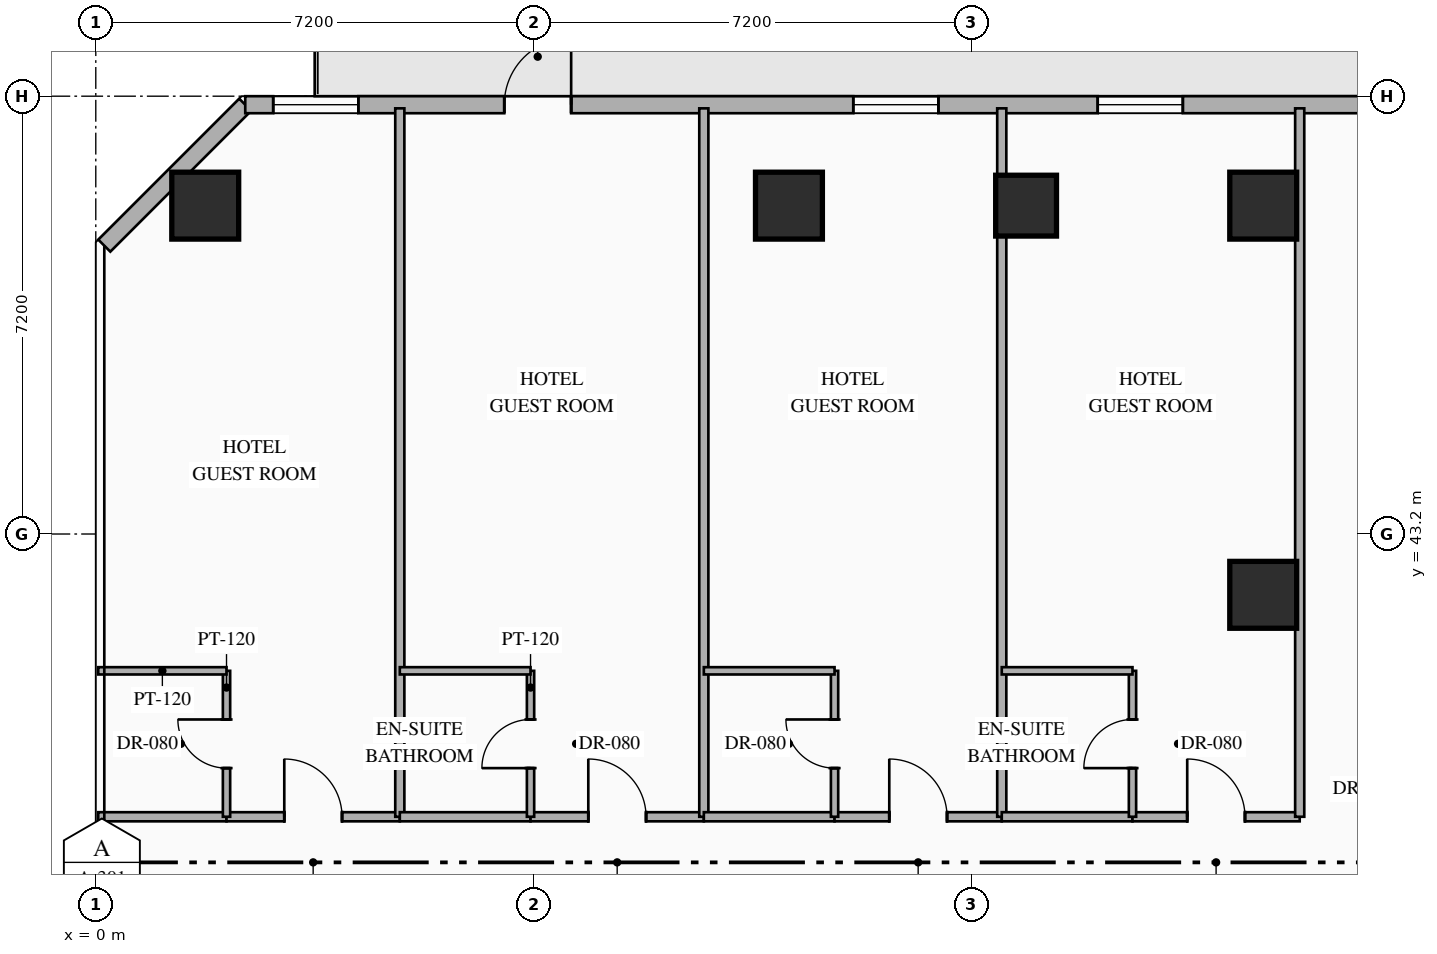
"""IFC4 building model, lengths in metres.
Left out: names, types, materials, properties, quantities, classifications, styles, units other than length and angle.
Written with IfcOpenShell. Run it as: python <this file> out.ifc"""

import sys

from ifc_helpers import new_model, si_unit, direction, frame, frame_2d, origin, origin_2d, place, context, subcontext, project, spatial, rectangle, hollow_rectangle, extrude, element, fill, save


model = new_model("IFC4")
c1 = context("Model", 3, precision=1e-05, world=origin(), true_north=direction((0.0, 1.0)))
c2 = subcontext(c1, "Body", "Model", "MODEL_VIEW")
j1 = project(units=[si_unit("LENGTHUNIT", "METRE"), si_unit("PLANEANGLEUNIT", "RADIAN")], contexts=[c1])
p1 = place(None, origin())
s1 = spatial("IfcSite", under=j1, at=p1, CompositionType="ELEMENT")
p2 = place(p1, origin())
s2 = spatial("IfcBuilding", under=s1, at=p2, CompositionType="ELEMENT")
p3 = place(p2, frame((0.0, 0.0, 56.7)))
s3 = spatial("IfcBuildingStorey", under=s2, at=p3, CompositionType="ELEMENT", Elevation=56.7)
for number, where, z_axis, x_axis in (
    (1, (1.8, 48.6, 0.0), (0.0, 0.0, 1.0), (1.0, 0.0, 0.0)),
    (2, (11.4, 48.6, 0.0), (0.0, 0.0, 1.0), (1.0, 0.0, 0.0)),
    (3, (19.2, 48.6, 0.0), (0.0, 0.0, 1.0), (1.0, 0.0, 0.0)),
    (4, (19.2, 42.2, 0.0), (0.0, 0.0, 1.0), (1.0, 0.0, 0.0)),
):
    element("IfcColumn", number, at=place(p3, frame(where, z_axis=z_axis, x_axis=x_axis)), inside=s3, PredefinedType="COLUMN", context=c2, shape_type="SweptSolid", body=[
        extrude(hollow_rectangle(XDim=1.1, YDim=1.1, WallThickness=0.04, at=origin_2d()), origin(), (0.0, 0.0, 1.0), 3.35),
    ])
p4 = place(p3, frame((15.3, 48.6, 0.0), z_axis=(0.0, 0.0, 1.0), x_axis=(1.0, 0.0, 0.0)))
e5 = element("IfcColumn", 5, at=p4, inside=s3, PredefinedType="COLUMN", context=c2, shape_type="SweptSolid", body=[
    extrude(hollow_rectangle(XDim=1.0, YDim=1.0, WallThickness=0.038, at=origin_2d()), origin(), (0.0, 0.0, 1.0), 3.35),
])
p5 = place(p3, frame((0.14, 47.942, 0.0), z_axis=(0.0, 0.0, 1.0), x_axis=(0.707106781187, 0.707106781187, 0.0)))
e6 = element("IfcWall", 6, at=p5, inside=s3, PredefinedType="STANDARD", context=c2, shape_type="SweptSolid", body=[
    extrude(rectangle(XDim=3.278, YDim=0.28, at=frame_2d((1.639, 0.0))), origin(), (0.0, 0.0, 1.0), 3.13),
])
p6 = place(p3, frame((2.458, 50.26, 0.0), z_axis=(0.0, 0.0, 1.0), x_axis=(1.0, 0.0, 0.0)))
e7 = element("IfcWall", 7, at=p6, inside=s3, PredefinedType="STANDARD", context=c2, shape_type="SweptSolid", body=[
    extrude(rectangle(XDim=40.084, YDim=0.28, at=frame_2d((20.042, 0.0))), origin(), (0.0, 0.0, 1.0), 3.13),
])
p7 = place(p6, frame((4.26, 0.0, 0.0)))
e8 = element("IfcOpeningElement", 8, at=p7, cuts=e7, PredefinedType="OPENING", context=c2, shape_type="SweptSolid", body=[
    extrude(rectangle(XDim=1.1, YDim=2.2, at=frame_2d((0.55, 1.1))), frame((0.0, 0.15, 0.0), z_axis=(0.0, -1.0, 0.0), x_axis=(1.0, 0.0, 0.0)), (0.0, 0.0, 1.0), 0.3),
])
p8 = place(p6, frame((0.46, 0.0, 0.85)))
e9 = element("IfcOpeningElement", 9, at=p8, cuts=e7, PredefinedType="OPENING", context=c2, shape_type="SweptSolid", body=[
    extrude(rectangle(XDim=1.4, YDim=1.8, at=frame_2d((0.7, 0.9))), frame((0.0, 0.15, 0.0), z_axis=(0.0, -1.0, 0.0), x_axis=(1.0, 0.0, 0.0)), (0.0, 0.0, 1.0), 0.3),
])
p9 = place(p6, frame((10.0, 0.0, 0.85)))
e10 = element("IfcOpeningElement", 10, at=p9, cuts=e7, PredefinedType="OPENING", context=c2, shape_type="SweptSolid", body=[
    extrude(rectangle(XDim=1.4, YDim=1.8, at=frame_2d((0.7, 0.9))), frame((0.0, 0.15, 0.0), z_axis=(0.0, -1.0, 0.0), x_axis=(1.0, 0.0, 0.0)), (0.0, 0.0, 1.0), 0.3),
])
p10 = place(p6, frame((14.02, 0.0, 0.85)))
e11 = element("IfcOpeningElement", 11, at=p10, cuts=e7, PredefinedType="OPENING", context=c2, shape_type="SweptSolid", body=[
    extrude(rectangle(XDim=1.4, YDim=1.8, at=frame_2d((0.7, 0.9))), frame((0.0, 0.15, 0.0), z_axis=(0.0, -1.0, 0.0), x_axis=(1.0, 0.0, 0.0)), (0.0, 0.0, 1.0), 0.3),
])
p11 = place(p6, frame((20.789, 0.0, 0.85)))
e12 = element("IfcOpeningElement", 12, at=p11, cuts=e7, PredefinedType="OPENING", context=c2, shape_type="SweptSolid", body=[
    extrude(rectangle(XDim=1.4, YDim=1.8, at=frame_2d((0.7, 0.9))), frame((0.0, 0.15, 0.0), z_axis=(0.0, -1.0, 0.0), x_axis=(1.0, 0.0, 0.0)), (0.0, 0.0, 1.0), 0.3),
])
p12 = place(p6, frame((24.664, 0.0, 0.85)))
e13 = element("IfcOpeningElement", 13, at=p12, cuts=e7, PredefinedType="OPENING", context=c2, shape_type="SweptSolid", body=[
    extrude(rectangle(XDim=1.4, YDim=1.8, at=frame_2d((0.7, 0.9))), frame((0.0, 0.15, 0.0), z_axis=(0.0, -1.0, 0.0), x_axis=(1.0, 0.0, 0.0)), (0.0, 0.0, 1.0), 0.3),
])
p13 = place(p6, frame((26.803, 0.0, 0.85)))
e14 = element("IfcOpeningElement", 14, at=p13, cuts=e7, PredefinedType="OPENING", context=c2, shape_type="SweptSolid", body=[
    extrude(rectangle(XDim=1.4, YDim=1.8, at=frame_2d((0.7, 0.9))), frame((0.0, 0.15, 0.0), z_axis=(0.0, -1.0, 0.0), x_axis=(1.0, 0.0, 0.0)), (0.0, 0.0, 1.0), 0.3),
])
p14 = place(p6, frame((32.703, 0.0, 0.85)))
e15 = element("IfcOpeningElement", 15, at=p14, cuts=e7, PredefinedType="OPENING", context=c2, shape_type="SweptSolid", body=[
    extrude(rectangle(XDim=1.4, YDim=1.8, at=frame_2d((0.7, 0.9))), frame((0.0, 0.15, 0.0), z_axis=(0.0, -1.0, 0.0), x_axis=(1.0, 0.0, 0.0)), (0.0, 0.0, 1.0), 0.3),
])
p15 = place(p6, frame((36.967, 0.0, 0.85)))
e16 = element("IfcOpeningElement", 16, at=p15, cuts=e7, PredefinedType="OPENING", context=c2, shape_type="SweptSolid", body=[
    extrude(rectangle(XDim=1.4, YDim=1.8, at=frame_2d((0.7, 0.9))), frame((0.0, 0.15, 0.0), z_axis=(0.0, -1.0, 0.0), x_axis=(1.0, 0.0, 0.0)), (0.0, 0.0, 1.0), 0.3),
])
p16 = place(p3, frame((0.04, 38.55, 0.0), z_axis=(0.0, 0.0, 1.0), x_axis=(1.0, 0.0, 0.0)))
e17 = element("IfcWall", 17, at=p16, inside=s3, PredefinedType="PARTITIONING", context=c2, shape_type="SweptSolid", body=[
    extrude(rectangle(XDim=2.11, YDim=0.15, at=frame_2d((1.055, 0.0))), origin(), (0.0, 0.0, 1.0), 2.775),
])
p17 = place(p3, frame((2.15, 38.55, 0.0), z_axis=(0.0, 0.0, 1.0), x_axis=(1.0, 0.0, 0.0)))
e18 = element("IfcWall", 18, at=p17, inside=s3, PredefinedType="PARTITIONING", context=c2, shape_type="SweptSolid", body=[
    extrude(rectangle(XDim=2.85, YDim=0.15, at=frame_2d((1.425, 0.0))), origin(), (0.0, 0.0, 1.0), 2.775),
])
p18 = place(p17, frame((0.95, 0.0, 0.0)))
e19 = element("IfcOpeningElement", 19, at=p18, cuts=e18, PredefinedType="OPENING", context=c2, shape_type="SweptSolid", body=[
    extrude(rectangle(XDim=0.95, YDim=2.15, at=frame_2d((0.475, 1.075))), frame((0.0, 0.085, 0.0), z_axis=(0.0, -1.0, 0.0), x_axis=(1.0, 0.0, 0.0)), (0.0, 0.0, 1.0), 0.17),
])
p19 = place(p3, frame((2.15, 38.55, 0.0), z_axis=(0.0, 0.0, 1.0), x_axis=(0.0, 1.0, 0.0)))
e20 = element("IfcWall", 20, at=p19, inside=s3, PredefinedType="PARTITIONING", context=c2, shape_type="SweptSolid", body=[
    extrude(rectangle(XDim=2.4, YDim=0.12, at=frame_2d((1.2, 0.0))), origin(), (0.0, 0.0, 1.0), 3.13),
])
p20 = place(p19, frame((0.8, 0.0, 0.0)))
e21 = element("IfcOpeningElement", 21, at=p20, cuts=e20, PredefinedType="OPENING", context=c2, shape_type="SweptSolid", body=[
    extrude(rectangle(XDim=0.8, YDim=2.06, at=frame_2d((0.4, 1.03))), frame((0.0, 0.07, 0.0), z_axis=(0.0, -1.0, 0.0), x_axis=(1.0, 0.0, 0.0)), (0.0, 0.0, 1.0), 0.14),
])
p21 = place(p3, frame((0.04, 40.95, 0.0), z_axis=(0.0, 0.0, 1.0), x_axis=(1.0, 0.0, 0.0)))
e22 = element("IfcWall", 22, at=p21, inside=s3, PredefinedType="PARTITIONING", context=c2, shape_type="SweptSolid", body=[
    extrude(rectangle(XDim=2.11, YDim=0.12, at=frame_2d((1.055, 0.0))), origin(), (0.0, 0.0, 1.0), 2.775),
])
p22 = place(p3, frame((5.0, 38.55, 0.0), z_axis=(0.0, 0.0, 1.0), x_axis=(0.0, 1.0, 0.0)))
e23 = element("IfcWall", 23, at=p22, inside=s3, PredefinedType="PARTITIONING", context=c2, shape_type="SweptSolid", body=[
    extrude(rectangle(XDim=11.65, YDim=0.15, at=frame_2d((5.825, 0.0))), origin(), (0.0, 0.0, 1.0), 3.13),
])
p23 = place(p3, frame((5.0, 38.55, 0.0), z_axis=(0.0, 0.0, 1.0), x_axis=(1.0, 0.0, 0.0)))
e24 = element("IfcWall", 24, at=p23, inside=s3, PredefinedType="PARTITIONING", context=c2, shape_type="SweptSolid", body=[
    extrude(rectangle(XDim=2.15, YDim=0.15, at=frame_2d((1.075, 0.0))), origin(), (0.0, 0.0, 1.0), 2.775),
])
p24 = place(p3, frame((7.15, 38.55, 0.0), z_axis=(0.0, 0.0, 1.0), x_axis=(1.0, 0.0, 0.0)))
e25 = element("IfcWall", 25, at=p24, inside=s3, PredefinedType="PARTITIONING", context=c2, shape_type="SweptSolid", body=[
    extrude(rectangle(XDim=2.85, YDim=0.15, at=frame_2d((1.425, 0.0))), origin(), (0.0, 0.0, 1.0), 2.775),
])
p25 = place(p24, frame((0.95, 0.0, 0.0)))
e26 = element("IfcOpeningElement", 26, at=p25, cuts=e25, PredefinedType="OPENING", context=c2, shape_type="SweptSolid", body=[
    extrude(rectangle(XDim=0.95, YDim=2.15, at=frame_2d((0.475, 1.075))), frame((0.0, 0.085, 0.0), z_axis=(0.0, -1.0, 0.0), x_axis=(1.0, 0.0, 0.0)), (0.0, 0.0, 1.0), 0.17),
])
p26 = place(p3, frame((7.15, 38.55, 0.0), z_axis=(0.0, 0.0, 1.0), x_axis=(0.0, 1.0, 0.0)))
e27 = element("IfcWall", 27, at=p26, inside=s3, PredefinedType="PARTITIONING", context=c2, shape_type="SweptSolid", body=[
    extrude(rectangle(XDim=2.4, YDim=0.12, at=frame_2d((1.2, 0.0))), origin(), (0.0, 0.0, 1.0), 3.13),
])
p27 = place(p26, frame((0.8, 0.0, 0.0)))
e28 = element("IfcOpeningElement", 28, at=p27, cuts=e27, PredefinedType="OPENING", context=c2, shape_type="SweptSolid", body=[
    extrude(rectangle(XDim=0.8, YDim=2.06, at=frame_2d((0.4, 1.03))), frame((0.0, 0.07, 0.0), z_axis=(0.0, -1.0, 0.0), x_axis=(1.0, 0.0, 0.0)), (0.0, 0.0, 1.0), 0.14),
])
p28 = place(p3, frame((5.0, 40.95, 0.0), z_axis=(0.0, 0.0, 1.0), x_axis=(1.0, 0.0, 0.0)))
e29 = element("IfcWall", 29, at=p28, inside=s3, PredefinedType="PARTITIONING", context=c2, shape_type="SweptSolid", body=[
    extrude(rectangle(XDim=2.15, YDim=0.12, at=frame_2d((1.075, 0.0))), origin(), (0.0, 0.0, 1.0), 2.775),
])
p29 = place(p3, frame((10.0, 38.55, 0.0), z_axis=(0.0, 0.0, 1.0), x_axis=(0.0, 1.0, 0.0)))
e30 = element("IfcWall", 30, at=p29, inside=s3, PredefinedType="PARTITIONING", context=c2, shape_type="SweptSolid", body=[
    extrude(rectangle(XDim=11.65, YDim=0.15, at=frame_2d((5.825, 0.0))), origin(), (0.0, 0.0, 1.0), 3.13),
])
p30 = place(p3, frame((10.0, 38.55, 0.0), z_axis=(0.0, 0.0, 1.0), x_axis=(1.0, 0.0, 0.0)))
e31 = element("IfcWall", 31, at=p30, inside=s3, PredefinedType="PARTITIONING", context=c2, shape_type="SweptSolid", body=[
    extrude(rectangle(XDim=2.15, YDim=0.15, at=frame_2d((1.075, 0.0))), origin(), (0.0, 0.0, 1.0), 2.775),
])
p31 = place(p3, frame((12.15, 38.55, 0.0), z_axis=(0.0, 0.0, 1.0), x_axis=(1.0, 0.0, 0.0)))
e32 = element("IfcWall", 32, at=p31, inside=s3, PredefinedType="PARTITIONING", context=c2, shape_type="SweptSolid", body=[
    extrude(rectangle(XDim=2.75, YDim=0.15, at=frame_2d((1.375, 0.0))), origin(), (0.0, 0.0, 1.0), 2.775),
])
p32 = place(p31, frame((0.9, 0.0, 0.0)))
e33 = element("IfcOpeningElement", 33, at=p32, cuts=e32, PredefinedType="OPENING", context=c2, shape_type="SweptSolid", body=[
    extrude(rectangle(XDim=0.95, YDim=2.15, at=frame_2d((0.475, 1.075))), frame((0.0, 0.085, 0.0), z_axis=(0.0, -1.0, 0.0), x_axis=(1.0, 0.0, 0.0)), (0.0, 0.0, 1.0), 0.17),
])
p33 = place(p3, frame((12.15, 38.55, 0.0), z_axis=(0.0, 0.0, 1.0), x_axis=(0.0, 1.0, 0.0)))
e34 = element("IfcWall", 34, at=p33, inside=s3, PredefinedType="PARTITIONING", context=c2, shape_type="SweptSolid", body=[
    extrude(rectangle(XDim=2.4, YDim=0.12, at=frame_2d((1.2, 0.0))), origin(), (0.0, 0.0, 1.0), 3.13),
])
p34 = place(p33, frame((0.8, 0.0, 0.0)))
e35 = element("IfcOpeningElement", 35, at=p34, cuts=e34, PredefinedType="OPENING", context=c2, shape_type="SweptSolid", body=[
    extrude(rectangle(XDim=0.8, YDim=2.06, at=frame_2d((0.4, 1.03))), frame((0.0, 0.07, 0.0), z_axis=(0.0, -1.0, 0.0), x_axis=(1.0, 0.0, 0.0)), (0.0, 0.0, 1.0), 0.14),
])
p35 = place(p3, frame((10.0, 40.95, 0.0), z_axis=(0.0, 0.0, 1.0), x_axis=(1.0, 0.0, 0.0)))
e36 = element("IfcWall", 36, at=p35, inside=s3, PredefinedType="PARTITIONING", context=c2, shape_type="SweptSolid", body=[
    extrude(rectangle(XDim=2.15, YDim=0.12, at=frame_2d((1.075, 0.0))), origin(), (0.0, 0.0, 1.0), 2.775),
])
p36 = place(p3, frame((14.9, 38.55, 0.0), z_axis=(0.0, 0.0, 1.0), x_axis=(0.0, 1.0, 0.0)))
e37 = element("IfcWall", 37, at=p36, inside=s3, PredefinedType="PARTITIONING", context=c2, shape_type="SweptSolid", body=[
    extrude(rectangle(XDim=11.65, YDim=0.15, at=frame_2d((5.825, 0.0))), origin(), (0.0, 0.0, 1.0), 3.13),
])
p37 = place(p3, frame((14.9, 38.55, 0.0), z_axis=(0.0, 0.0, 1.0), x_axis=(1.0, 0.0, 0.0)))
e38 = element("IfcWall", 38, at=p37, inside=s3, PredefinedType="PARTITIONING", context=c2, shape_type="SweptSolid", body=[
    extrude(rectangle(XDim=2.15, YDim=0.15, at=frame_2d((1.075, 0.0))), origin(), (0.0, 0.0, 1.0), 2.775),
])
p38 = place(p3, frame((17.05, 38.55, 0.0), z_axis=(0.0, 0.0, 1.0), x_axis=(1.0, 0.0, 0.0)))
e39 = element("IfcWall", 39, at=p38, inside=s3, PredefinedType="PARTITIONING", context=c2, shape_type="SweptSolid", body=[
    extrude(rectangle(XDim=2.75, YDim=0.15, at=frame_2d((1.375, 0.0))), origin(), (0.0, 0.0, 1.0), 2.775),
])
p39 = place(p38, frame((0.9, 0.0, 0.0)))
e40 = element("IfcOpeningElement", 40, at=p39, cuts=e39, PredefinedType="OPENING", context=c2, shape_type="SweptSolid", body=[
    extrude(rectangle(XDim=0.95, YDim=2.15, at=frame_2d((0.475, 1.075))), frame((0.0, 0.085, 0.0), z_axis=(0.0, -1.0, 0.0), x_axis=(1.0, 0.0, 0.0)), (0.0, 0.0, 1.0), 0.17),
])
p40 = place(p3, frame((17.05, 38.55, 0.0), z_axis=(0.0, 0.0, 1.0), x_axis=(0.0, 1.0, 0.0)))
e41 = element("IfcWall", 41, at=p40, inside=s3, PredefinedType="PARTITIONING", context=c2, shape_type="SweptSolid", body=[
    extrude(rectangle(XDim=2.4, YDim=0.12, at=frame_2d((1.2, 0.0))), origin(), (0.0, 0.0, 1.0), 3.13),
])
p41 = place(p40, frame((0.8, 0.0, 0.0)))
e42 = element("IfcOpeningElement", 42, at=p41, cuts=e41, PredefinedType="OPENING", context=c2, shape_type="SweptSolid", body=[
    extrude(rectangle(XDim=0.8, YDim=2.06, at=frame_2d((0.4, 1.03))), frame((0.0, 0.07, 0.0), z_axis=(0.0, -1.0, 0.0), x_axis=(1.0, 0.0, 0.0)), (0.0, 0.0, 1.0), 0.14),
])
p42 = place(p3, frame((14.9, 40.95, 0.0), z_axis=(0.0, 0.0, 1.0), x_axis=(1.0, 0.0, 0.0)))
e43 = element("IfcWall", 43, at=p42, inside=s3, PredefinedType="PARTITIONING", context=c2, shape_type="SweptSolid", body=[
    extrude(rectangle(XDim=2.15, YDim=0.12, at=frame_2d((1.075, 0.0))), origin(), (0.0, 0.0, 1.0), 2.775),
])
p43 = place(p3, frame((19.8, 38.55, 0.0), z_axis=(0.0, 0.0, 1.0), x_axis=(0.0, 1.0, 0.0)))
e44 = element("IfcWall", 44, at=p43, inside=s3, PredefinedType="PARTITIONING", context=c2, shape_type="SweptSolid", body=[
    extrude(rectangle(XDim=11.65, YDim=0.15, at=frame_2d((5.825, 0.0))), origin(), (0.0, 0.0, 1.0), 3.13),
])
p44 = place(p7, origin())
e45 = element("IfcDoor", 45, at=p44, inside=s3, OperationType="SINGLE_SWING_RIGHT", PredefinedType="DOOR", context=c2, shape_type="SweptSolid", body=[
    extrude(rectangle(XDim=1.1, YDim=2.2, at=frame_2d((0.55, 1.1))), frame((0.0, 0.025, 0.0), z_axis=(0.0, -1.0, 0.0), x_axis=(1.0, 0.0, 0.0)), (0.0, 0.0, 1.0), 0.05),
])
fill(e8, e45)
p45 = place(p8, origin())
e46 = element("IfcWindow", 46, at=p45, inside=s3, PartitioningType="SINGLE_PANEL", PredefinedType="WINDOW", context=c2, shape_type="SweptSolid", body=[
    extrude(rectangle(XDim=1.4, YDim=1.8, at=frame_2d((0.7, 0.9))), frame((0.0, 0.03, 0.0), z_axis=(0.0, -1.0, 0.0), x_axis=(1.0, 0.0, 0.0)), (0.0, 0.0, 1.0), 0.06),
])
fill(e9, e46)
p46 = place(p9, origin())
e47 = element("IfcWindow", 47, at=p46, inside=s3, PartitioningType="SINGLE_PANEL", PredefinedType="WINDOW", context=c2, shape_type="SweptSolid", body=[
    extrude(rectangle(XDim=1.4, YDim=1.8, at=frame_2d((0.7, 0.9))), frame((0.0, 0.03, 0.0), z_axis=(0.0, -1.0, 0.0), x_axis=(1.0, 0.0, 0.0)), (0.0, 0.0, 1.0), 0.06),
])
fill(e10, e47)
p47 = place(p10, origin())
e48 = element("IfcWindow", 48, at=p47, inside=s3, PartitioningType="SINGLE_PANEL", PredefinedType="WINDOW", context=c2, shape_type="SweptSolid", body=[
    extrude(rectangle(XDim=1.4, YDim=1.8, at=frame_2d((0.7, 0.9))), frame((0.0, 0.03, 0.0), z_axis=(0.0, -1.0, 0.0), x_axis=(1.0, 0.0, 0.0)), (0.0, 0.0, 1.0), 0.06),
])
fill(e11, e48)
p48 = place(p18, origin())
e49 = element("IfcDoor", 49, at=p48, inside=s3, OperationType="SINGLE_SWING_LEFT", PredefinedType="DOOR", context=c2, shape_type="SweptSolid", body=[
    extrude(rectangle(XDim=0.95, YDim=2.15, at=frame_2d((0.475, 1.075))), frame((0.0, 0.025, 0.0), z_axis=(0.0, -1.0, 0.0), x_axis=(1.0, 0.0, 0.0)), (0.0, 0.0, 1.0), 0.05),
])
fill(e19, e49)
p49 = place(p20, origin())
e50 = element("IfcDoor", 50, at=p49, inside=s3, OperationType="SINGLE_SWING_RIGHT", PredefinedType="DOOR", context=c2, shape_type="SweptSolid", body=[
    extrude(rectangle(XDim=0.8, YDim=2.06, at=frame_2d((0.4, 1.03))), frame((0.0, 0.025, 0.0), z_axis=(0.0, -1.0, 0.0), x_axis=(1.0, 0.0, 0.0)), (0.0, 0.0, 1.0), 0.05),
])
fill(e21, e50)
p50 = place(p25, origin())
e51 = element("IfcDoor", 51, at=p50, inside=s3, OperationType="SINGLE_SWING_LEFT", PredefinedType="DOOR", context=c2, shape_type="SweptSolid", body=[
    extrude(rectangle(XDim=0.95, YDim=2.15, at=frame_2d((0.475, 1.075))), frame((0.0, 0.025, 0.0), z_axis=(0.0, -1.0, 0.0), x_axis=(1.0, 0.0, 0.0)), (0.0, 0.0, 1.0), 0.05),
])
fill(e26, e51)
p51 = place(p27, origin())
e52 = element("IfcDoor", 52, at=p51, inside=s3, OperationType="SINGLE_SWING_LEFT", PredefinedType="DOOR", context=c2, shape_type="SweptSolid", body=[
    extrude(rectangle(XDim=0.8, YDim=2.06, at=frame_2d((0.4, 1.03))), frame((0.0, 0.025, 0.0), z_axis=(0.0, -1.0, 0.0), x_axis=(1.0, 0.0, 0.0)), (0.0, 0.0, 1.0), 0.05),
])
fill(e28, e52)
p52 = place(p32, origin())
e53 = element("IfcDoor", 53, at=p52, inside=s3, OperationType="SINGLE_SWING_LEFT", PredefinedType="DOOR", context=c2, shape_type="SweptSolid", body=[
    extrude(rectangle(XDim=0.95, YDim=2.15, at=frame_2d((0.475, 1.075))), frame((0.0, 0.025, 0.0), z_axis=(0.0, -1.0, 0.0), x_axis=(1.0, 0.0, 0.0)), (0.0, 0.0, 1.0), 0.05),
])
fill(e33, e53)
p53 = place(p34, origin())
e54 = element("IfcDoor", 54, at=p53, inside=s3, OperationType="SINGLE_SWING_RIGHT", PredefinedType="DOOR", context=c2, shape_type="SweptSolid", body=[
    extrude(rectangle(XDim=0.8, YDim=2.06, at=frame_2d((0.4, 1.03))), frame((0.0, 0.025, 0.0), z_axis=(0.0, -1.0, 0.0), x_axis=(1.0, 0.0, 0.0)), (0.0, 0.0, 1.0), 0.05),
])
fill(e35, e54)
p54 = place(p39, origin())
e55 = element("IfcDoor", 55, at=p54, inside=s3, OperationType="SINGLE_SWING_LEFT", PredefinedType="DOOR", context=c2, shape_type="SweptSolid", body=[
    extrude(rectangle(XDim=0.95, YDim=2.15, at=frame_2d((0.475, 1.075))), frame((0.0, 0.025, 0.0), z_axis=(0.0, -1.0, 0.0), x_axis=(1.0, 0.0, 0.0)), (0.0, 0.0, 1.0), 0.05),
])
fill(e40, e55)
p55 = place(p41, origin())
e56 = element("IfcDoor", 56, at=p55, inside=s3, OperationType="SINGLE_SWING_LEFT", PredefinedType="DOOR", context=c2, shape_type="SweptSolid", body=[
    extrude(rectangle(XDim=0.8, YDim=2.06, at=frame_2d((0.4, 1.03))), frame((0.0, 0.025, 0.0), z_axis=(0.0, -1.0, 0.0), x_axis=(1.0, 0.0, 0.0)), (0.0, 0.0, 1.0), 0.05),
])
fill(e42, e56)
save(model, sys.argv[1])
